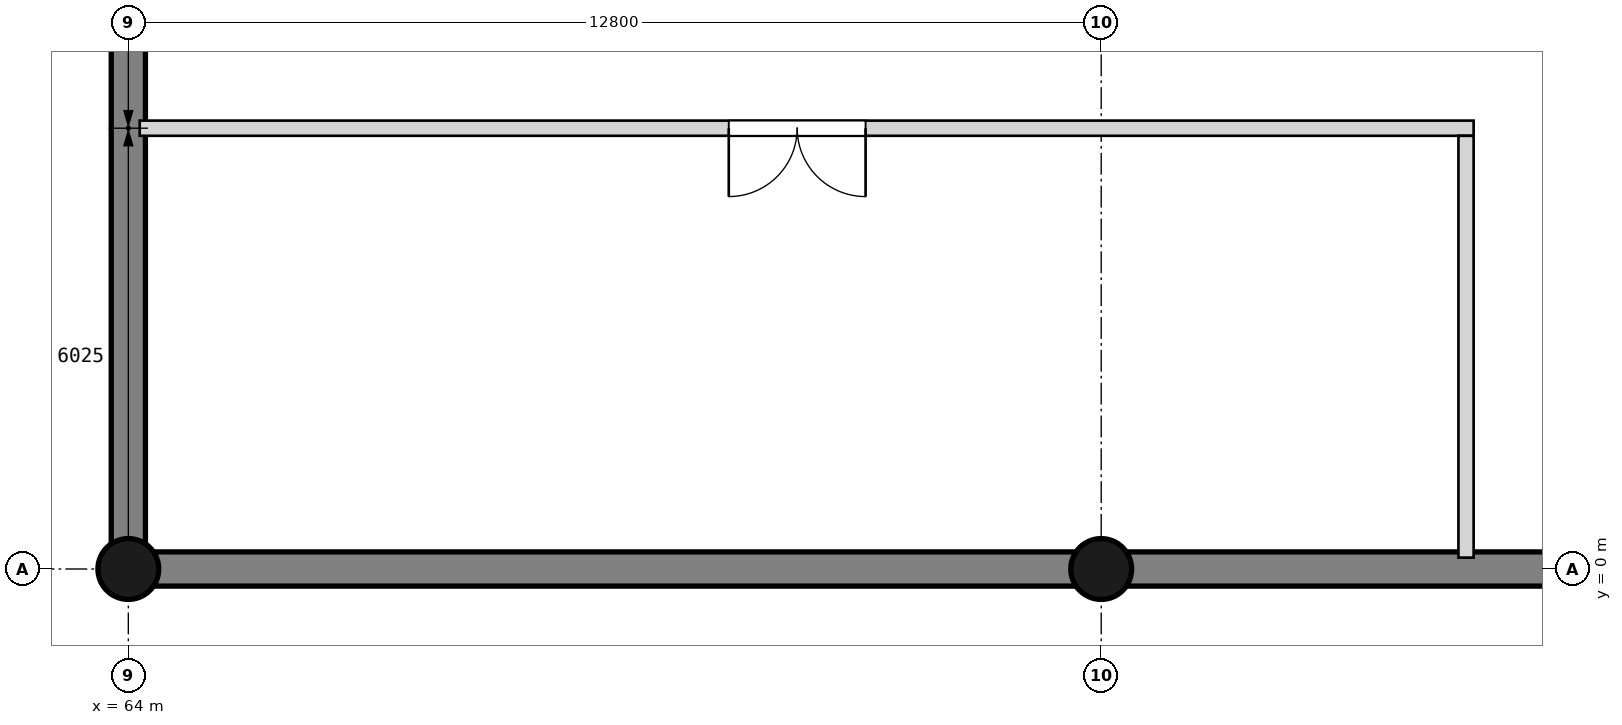
"""IFC4 building model, lengths in metres.
Left out: names, types, materials, properties, quantities, classifications, styles, units other than length and angle.
Written with IfcOpenShell. Run it as: python <this file> out.ifc"""

import sys

from ifc_helpers import new_model, si_unit, direction, frame, frame_2d, origin, origin_2d, place, context, subcontext, project, spatial, rectangle, circle, extrude, element, fill, save


model = new_model("IFC4")
c1 = context("Model", 3, precision=1e-05, world=origin(), true_north=direction((0.0, 1.0)))
c2 = subcontext(c1, "Body", "Model", "MODEL_VIEW")
j1 = project(units=[si_unit("LENGTHUNIT", "METRE"), si_unit("PLANEANGLEUNIT", "RADIAN")], contexts=[c1])
p1 = place(None, origin())
s1 = spatial("IfcSite", under=j1, at=p1, CompositionType="ELEMENT")
p2 = place(p1, origin())
s2 = spatial("IfcBuilding", under=s1, at=p2, CompositionType="ELEMENT")
p3 = place(p2, frame((0.0, 0.0, -4.8)))
s3 = spatial("IfcBuildingStorey", under=s2, at=p3, CompositionType="ELEMENT", Elevation=-4.8)
p4 = place(p3, frame((89.375, 0.0, 0.0), z_axis=(0.0, 0.0, 1.0), x_axis=(-1.0, 0.0, 0.0)))
e1 = element("IfcWall", 1, at=p4, inside=s3, PredefinedType="SOLIDWALL", context=c2, shape_type="SweptSolid", body=[
    extrude(rectangle(XDim=25.15, YDim=0.45, at=frame_2d((12.575, 0.0))), origin(), (0.0, 0.0, 1.0), 4.8),
])
p5 = place(p3, frame((64.0, -0.225, 0.0), z_axis=(0.0, 0.0, 1.0), x_axis=(0.0, 1.0, 0.0)))
e2 = element("IfcWall", 2, at=p5, inside=s3, PredefinedType="SOLIDWALL", context=c2, shape_type="SweptSolid", body=[
    extrude(rectangle(XDim=33.6, YDim=0.45, at=frame_2d((16.8, 0.0))), origin(), (0.0, 0.0, 1.0), 4.8),
])
for number, where, z_axis, x_axis in (
    (3, (76.8, 0.0, 0.0), (0.0, 0.0, 1.0), (1.0, 0.0, 0.0)),
    (4, (64.0, 0.0, 0.0), (0.0, 0.0, 1.0), (1.0, 0.0, 0.0)),
):
    element("IfcColumn", number, at=place(p3, frame(where, z_axis=z_axis, x_axis=x_axis)), inside=s3, PredefinedType="COLUMN", context=c2, shape_type="SweptSolid", body=[
        extrude(circle(Radius=0.4, at=origin_2d()), origin(), (0.0, 0.0, 1.0), 4.8),
    ])
p6 = place(p3, frame((81.7, 5.8, 0.0), z_axis=(0.0, 0.0, 1.0), x_axis=(-1.0, 0.0, 0.0)))
e5 = element("IfcWall", 5, at=p6, inside=s3, PredefinedType="PARTITIONING", context=c2, shape_type="SweptSolid", body=[
    extrude(rectangle(XDim=17.55, YDim=0.2, at=frame_2d((8.775, 0.0))), origin(), (0.0, 0.0, 1.0), 4.5),
])
p7 = place(p6, frame((8.0, 0.0, 0.0)))
e6 = element("IfcOpeningElement", 6, at=p7, cuts=e5, PredefinedType="OPENING", context=c2, shape_type="SweptSolid", body=[
    extrude(rectangle(XDim=1.8, YDim=2.1, at=frame_2d((0.9, 1.05))), frame((0.0, 0.11, 0.0), z_axis=(0.0, -1.0, 0.0), x_axis=(1.0, 0.0, 0.0)), (0.0, 0.0, 1.0), 0.22),
])
p8 = place(p3, frame((81.6, 0.15, 0.0), z_axis=(0.0, 0.0, 1.0), x_axis=(0.0, 1.0, 0.0)))
e7 = element("IfcWall", 7, at=p8, inside=s3, PredefinedType="PARTITIONING", context=c2, shape_type="SweptSolid", body=[
    extrude(rectangle(XDim=5.55, YDim=0.2, at=frame_2d((2.775, 0.0))), origin(), (0.0, 0.0, 1.0), 4.5),
])
p9 = place(p7, origin())
e8 = element("IfcDoor", 8, at=p9, inside=s3, OperationType="DOUBLE_DOOR_SINGLE_SWING", PredefinedType="DOOR", context=c2, shape_type="SweptSolid", body=[
    extrude(rectangle(XDim=1.8, YDim=2.1, at=frame_2d((0.9, 1.05))), frame((0.0, 0.025, 0.0), z_axis=(0.0, -1.0, 0.0), x_axis=(1.0, 0.0, 0.0)), (0.0, 0.0, 1.0), 0.05),
])
fill(e6, e8)
save(model, sys.argv[1])
